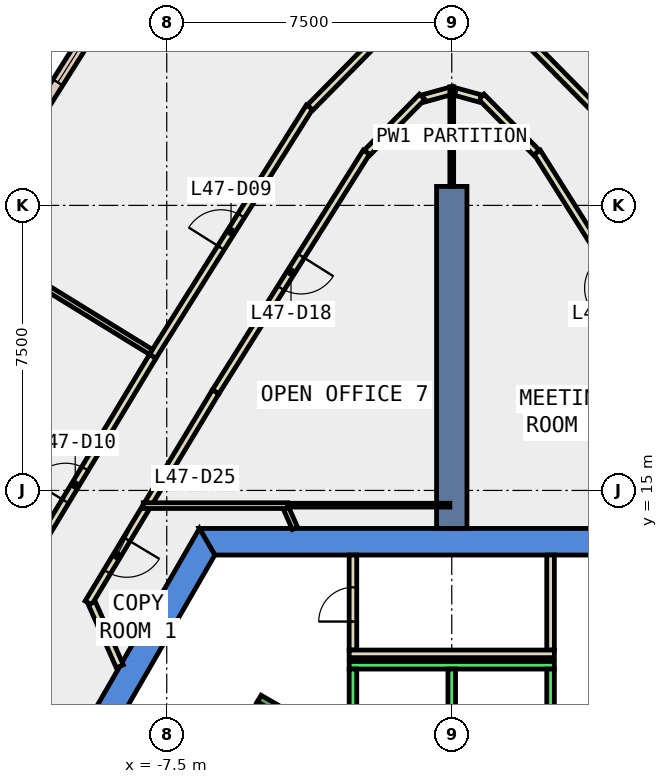
"""IFC4 building model, lengths in metres.
Left out: names, types, materials, properties, quantities, classifications, styles, units other than length and angle.
Written with IfcOpenShell. Run it as: python <this file> out.ifc"""

import sys

from ifc_helpers import new_model, si_unit, direction, frame, frame_2d, origin, place, context, subcontext, project, spatial, polyline, rectangle, outline, extrude, element, fill, save


model = new_model("IFC4")
c1 = context("Model", 3, precision=1e-05, world=origin(), true_north=direction((0.0, 1.0)))
c2 = subcontext(c1, "Body", "Model", "MODEL_VIEW")
j1 = project(units=[si_unit("LENGTHUNIT", "METRE"), si_unit("PLANEANGLEUNIT", "RADIAN")], contexts=[c1])
p1 = place(None, origin())
s1 = spatial("IfcSite", under=j1, at=p1, CompositionType="ELEMENT")
p2 = place(p1, origin())
s2 = spatial("IfcBuilding", under=s1, at=p2, CompositionType="ELEMENT")
p3 = place(p2, frame((0.0, 0.0, 210.8)))
s3 = spatial("IfcBuildingStorey", under=s2, at=p3, CompositionType="ELEMENT", Elevation=210.8)
p4 = place(p3, frame((0.0, 0.0, -0.4)))
e1 = element("IfcWall", 1, at=p4, inside=s3, PredefinedType="SHEAR", context=c2, shape_type="SweptSolid", body=[
    extrude(outline(polyline([(6.64, 14.0), (-6.64, 14.0), (-6.235, 13.3), (6.235, 13.3), (6.64, 14.0)])), origin(), (0.0, 0.0, 1.0), 4.2),
])
p5 = place(p3, frame((0.0, 0.0, -0.4)))
e2 = element("IfcWall", 2, at=p5, inside=s3, PredefinedType="SHEAR", context=c2, shape_type="SweptSolid", body=[
    extrude(outline(polyline([(-11.834, 5.002), (-11.228, 4.652), (-6.235, 13.3), (-6.64, 14.0), (-11.834, 5.002)])), origin(), (0.0, 0.0, 1.0), 4.2),
])
p6 = place(p3, frame((0.0, 14.0, -0.4), z_axis=(0.0, 0.0, 1.0), x_axis=(0.0, 1.0, 0.0)))
e3 = element("IfcWall", 3, at=p6, inside=s3, PredefinedType="SHEAR", context=c2, shape_type="SweptSolid", body=[
    extrude(rectangle(XDim=9.0, YDim=0.8, at=frame_2d((4.5, 0.0))), origin(), (0.0, 0.0, 1.0), 4.2),
])
p7 = place(p3, frame((-8.759, 28.29, 0.0), z_axis=(0.0, 0.0, 1.0), x_axis=(-0.532522107002, -0.84641609481, 0.0)))
e4 = element("IfcWall", 4, at=p7, inside=s3, PredefinedType="STANDARD", context=c2, shape_type="SweptSolid", body=[
    extrude(rectangle(XDim=7.273, YDim=0.3, at=frame_2d((3.636, 0.0))), origin(), (0.0, 0.0, 1.0), 3.8),
])
p8 = place(p7, frame((0.618, 0.0, 0.9)))
e5 = element("IfcOpeningElement", 5, at=p8, cuts=e4, PredefinedType="OPENING", context=c2, shape_type="SweptSolid", body=[
    extrude(rectangle(XDim=2.4, YDim=2.6, at=frame_2d((1.2, 1.3))), frame((0.0, 0.16, 0.0), z_axis=(0.0, -1.0, 0.0), x_axis=(1.0, 0.0, 0.0)), (0.0, 0.0, 1.0), 0.32),
])
p9 = place(p7, frame((4.255, 0.0, 0.9)))
e6 = element("IfcOpeningElement", 6, at=p9, cuts=e4, PredefinedType="OPENING", context=c2, shape_type="SweptSolid", body=[
    extrude(rectangle(XDim=2.4, YDim=2.6, at=frame_2d((1.2, 1.3))), frame((0.0, 0.16, 0.0), z_axis=(0.0, -1.0, 0.0), x_axis=(1.0, 0.0, 0.0)), (0.0, 0.0, 1.0), 0.32),
])
p10 = place(p3, frame((-8.057, 14.536, 0.0), z_axis=(0.0, 0.0, 1.0), x_axis=(-0.516268010323, -0.856427078926, 0.0)))
e7 = element("IfcWall", 7, at=p10, inside=s3, PredefinedType="PARTITIONING", context=c2, shape_type="SweptSolid", body=[
    extrude(rectangle(XDim=2.915, YDim=0.2, at=frame_2d((1.458, 0.0))), origin(), (0.0, 0.0, 1.0), 3.8),
])
p11 = place(p10, frame((0.958, 0.0, 0.0)))
e8 = element("IfcOpeningElement", 8, at=p11, cuts=e7, PredefinedType="OPENING", context=c2, shape_type="SweptSolid", body=[
    extrude(rectangle(XDim=1.0, YDim=2.1, at=frame_2d((0.5, 1.05))), frame((0.0, 0.11, 0.0), z_axis=(0.0, -1.0, 0.0), x_axis=(1.0, 0.0, 0.0)), (0.0, 0.0, 1.0), 0.22),
])
p12 = place(p3, frame((-9.47, 12.033, 0.0), z_axis=(0.0, 0.0, 1.0), x_axis=(0.40441741061, -0.914574522931, 0.0)))
e9 = element("IfcWall", 9, at=p12, inside=s3, PredefinedType="PARTITIONING", context=c2, shape_type="SweptSolid", body=[
    extrude(rectangle(XDim=1.817, YDim=0.2, at=frame_2d((0.909, 0.0))), origin(), (0.0, 0.0, 1.0), 3.8),
])
p13 = place(p3, frame((6.213, 17.595, 0.0), z_axis=(0.0, 0.0, 1.0), x_axis=(-0.532527247309, 0.846412860768, 0.0)))
e10 = element("IfcWall", 10, at=p13, inside=s3, PredefinedType="PARTITIONING", context=c2, shape_type="SweptSolid", body=[
    extrude(rectangle(XDim=7.449, YDim=0.2, at=frame_2d((3.725, 0.0))), origin(), (0.0, 0.0, 1.0), 3.8),
])
p14 = place(p13, frame((3.225, 0.0, 0.0)))
e11 = element("IfcOpeningElement", 11, at=p14, cuts=e10, PredefinedType="OPENING", context=c2, shape_type="SweptSolid", body=[
    extrude(rectangle(XDim=1.0, YDim=2.1, at=frame_2d((0.5, 1.05))), frame((0.0, 0.11, 0.0), z_axis=(0.0, -1.0, 0.0), x_axis=(1.0, 0.0, 0.0)), (0.0, 0.0, 1.0), 0.22),
])
p15 = place(p3, frame((2.229, 23.887, 0.0), z_axis=(0.0, 0.0, 1.0), x_axis=(-0.702245482258, 0.711934886523, 0.0)))
e12 = element("IfcWall", 12, at=p15, inside=s3, PredefinedType="PARTITIONING", context=c2, shape_type="SweptSolid", body=[
    extrude(rectangle(XDim=2.066, YDim=0.2, at=frame_2d((1.033, 0.0))), origin(), (0.0, 0.0, 1.0), 3.8),
])
p16 = place(p3, frame((0.752, 25.313, 0.0), z_axis=(0.0, 0.0, 1.0), x_axis=(-0.964381816756, 0.264514104559, 0.0)))
e13 = element("IfcWall", 13, at=p16, inside=s3, PredefinedType="PARTITIONING", context=c2, shape_type="SweptSolid", body=[
    extrude(rectangle(XDim=0.68, YDim=0.2, at=frame_2d((0.34, 0.0))), origin(), (0.0, 0.0, 1.0), 3.8),
])
p17 = place(p3, frame((0.048, 25.533, 0.0), z_axis=(0.0, 0.0, 1.0), x_axis=(-0.964218556253, -0.265108611286, 0.0)))
e14 = element("IfcWall", 14, at=p17, inside=s3, PredefinedType="PARTITIONING", context=c2, shape_type="SweptSolid", body=[
    extrude(rectangle(XDim=0.83, YDim=0.2, at=frame_2d((0.415, 0.0))), origin(), (0.0, 0.0, 1.0), 3.8),
])
p18 = place(p3, frame((-0.778, 25.358, 0.0), z_axis=(0.0, 0.0, 1.0), x_axis=(-0.702245482258, -0.711934886523, 0.0)))
e15 = element("IfcWall", 15, at=p18, inside=s3, PredefinedType="PARTITIONING", context=c2, shape_type="SweptSolid", body=[
    extrude(rectangle(XDim=2.066, YDim=0.2, at=frame_2d((1.033, 0.0))), origin(), (0.0, 0.0, 1.0), 3.8),
])
p19 = place(p3, frame((-2.246, 23.9, 0.0), z_axis=(0.0, 0.0, 1.0), x_axis=(-0.532527247309, -0.846412860768, 0.0)))
e16 = element("IfcWall", 16, at=p19, inside=s3, PredefinedType="PARTITIONING", context=c2, shape_type="SweptSolid", body=[
    extrude(rectangle(XDim=7.449, YDim=0.2, at=frame_2d((3.725, 0.0))), origin(), (0.0, 0.0, 1.0), 3.8),
])
p20 = place(p19, frame((3.225, 0.0, 0.0)))
e17 = element("IfcOpeningElement", 17, at=p20, cuts=e16, PredefinedType="OPENING", context=c2, shape_type="SweptSolid", body=[
    extrude(rectangle(XDim=1.0, YDim=2.1, at=frame_2d((0.5, 1.05))), frame((0.0, 0.11, 0.0), z_axis=(0.0, -1.0, 0.0), x_axis=(1.0, 0.0, 0.0)), (0.0, 0.0, 1.0), 0.22),
])
p21 = place(p3, frame((-6.213, 17.595, 0.0), z_axis=(0.0, 0.0, 1.0), x_axis=(-0.516121112316, -0.856515614231, 0.0)))
e18 = element("IfcWall", 18, at=p21, inside=s3, PredefinedType="PARTITIONING", context=c2, shape_type="SweptSolid", body=[
    extrude(rectangle(XDim=3.422, YDim=0.2, at=frame_2d((1.711, 0.0))), origin(), (0.0, 0.0, 1.0), 3.8),
])
p22 = place(p3, frame((-7.871, 18.528, 0.0), z_axis=(0.0, 0.0, 1.0), x_axis=(0.532587642146, 0.846374859878, 0.0)))
e19 = element("IfcWall", 19, at=p22, inside=s3, PredefinedType="PARTITIONING", context=c2, shape_type="SweptSolid", body=[
    extrude(rectangle(XDim=7.749, YDim=0.2, at=frame_2d((3.875, 0.0))), origin(), (0.0, 0.0, 1.0), 3.8),
])
p23 = place(p22, frame((3.375, 0.0, 0.0)))
e20 = element("IfcOpeningElement", 20, at=p23, cuts=e19, PredefinedType="OPENING", context=c2, shape_type="SweptSolid", body=[
    extrude(rectangle(XDim=1.0, YDim=2.1, at=frame_2d((0.5, 1.05))), frame((0.0, 0.11, 0.0), z_axis=(0.0, -1.0, 0.0), x_axis=(1.0, 0.0, 0.0)), (0.0, 0.0, 1.0), 0.22),
])
for number, where, z_axis, x_axis in (
    (21, (-3.727, 25.074, 0.0), (0.0, 0.0, 1.0), (0.702, 0.712, 0.0)),
    (22, (1.773, 27.056, 0.0), (0.0, 0.0, 1.0), (0.702, -0.712, 0.0)),
):
    element("IfcWall", number, at=place(p3, frame(where, z_axis=z_axis, x_axis=x_axis)), inside=s3, PredefinedType="PARTITIONING", context=c2, shape_type="SweptSolid", body=[
        extrude(rectangle(XDim=2.783, YDim=0.2, at=frame_2d((1.392, 0.0))), origin(), (0.0, 0.0, 1.0), 3.8),
    ])
p24 = place(p3, frame((-12.025, 11.633, 0.0), z_axis=(0.0, 0.0, 1.0), x_axis=(0.516283129542, 0.856417964636, 0.0)))
e23 = element("IfcWall", 23, at=p24, inside=s3, PredefinedType="PARTITIONING", context=c2, shape_type="SweptSolid", body=[
    extrude(rectangle(XDim=8.05, YDim=0.2, at=frame_2d((4.025, 0.0))), origin(), (0.0, 0.0, 1.0), 3.8),
])
p25 = place(p24, frame((3.6, 0.0, 0.0)))
e24 = element("IfcOpeningElement", 24, at=p25, cuts=e23, PredefinedType="OPENING", context=c2, shape_type="SweptSolid", body=[
    extrude(rectangle(XDim=1.0, YDim=2.1, at=frame_2d((0.5, 1.05))), frame((0.0, 0.11, 0.0), z_axis=(0.0, -1.0, 0.0), x_axis=(1.0, 0.0, 0.0)), (0.0, 0.0, 1.0), 0.22),
])
p26 = place(p3, frame((-2.6, 10.8, 0.0), z_axis=(0.0, 0.0, 1.0), x_axis=(0.0, 1.0, 0.0)))
e25 = element("IfcWall", 25, at=p26, inside=s3, PredefinedType="PARTITIONING", context=c2, shape_type="SweptSolid", body=[
    extrude(rectangle(XDim=2.5, YDim=0.2, at=frame_2d((1.25, 0.0))), origin(), (0.0, 0.0, 1.0), 3.8),
])
p27 = place(p26, frame((0.75, 0.0, 0.0)))
e26 = element("IfcOpeningElement", 26, at=p27, cuts=e25, PredefinedType="OPENING", context=c2, shape_type="SweptSolid", body=[
    extrude(rectangle(XDim=0.9, YDim=2.1, at=frame_2d((0.45, 1.05))), frame((0.0, 0.11, 0.0), z_axis=(0.0, -1.0, 0.0), x_axis=(1.0, 0.0, 0.0)), (0.0, 0.0, 1.0), 0.22),
])
p28 = place(p3, frame((2.6, 13.3, 0.0), z_axis=(0.0, 0.0, 1.0), x_axis=(0.0, -1.0, 0.0)))
e27 = element("IfcWall", 27, at=p28, inside=s3, PredefinedType="PARTITIONING", context=c2, shape_type="SweptSolid", body=[
    extrude(rectangle(XDim=2.5, YDim=0.2, at=frame_2d((1.25, 0.0))), origin(), (0.0, 0.0, 1.0), 3.8),
])
p29 = place(p3, frame((2.7, 10.7, 0.0), z_axis=(0.0, 0.0, 1.0), x_axis=(-1.0, 0.0, 0.0)))
e28 = element("IfcWall", 28, at=p29, inside=s3, PredefinedType="PARTITIONING", context=c2, shape_type="SweptSolid", body=[
    extrude(rectangle(XDim=5.4, YDim=0.2, at=frame_2d((2.7, 0.0))), origin(), (0.0, 0.0, 1.0), 3.8),
])
p30 = place(p3, frame((-4.125, 14.0, 0.0), z_axis=(0.0, 0.0, 1.0), x_axis=(-0.404850841056, 0.914382740703, 0.0)))
e29 = element("IfcWall", 29, at=p30, inside=s3, PredefinedType="PARTITIONING", context=c2, shape_type="SweptSolid", body=[
    extrude(rectangle(XDim=0.581, YDim=0.15, at=frame_2d((0.291, 0.0))), origin(), (0.0, 0.0, 1.0), 3.8),
])
p31 = place(p3, frame((-4.316, 14.6, 0.0), z_axis=(0.0, 0.0, 1.0), x_axis=(-1.0, 0.0, 0.0)))
e30 = element("IfcWall", 30, at=p31, inside=s3, PredefinedType="PARTITIONING", context=c2, shape_type="SweptSolid", body=[
    extrude(rectangle(XDim=3.802, YDim=0.15, at=frame_2d((1.901, 0.0))), origin(), (0.0, 0.0, 1.0), 3.8),
])
p32 = place(p3, frame((-4.316, 14.612, 0.0), z_axis=(0.0, 0.0, 1.0), x_axis=(1.0, 0.0, 0.0)))
e31 = element("IfcWall", 31, at=p32, inside=s3, PredefinedType="PARTITIONING", context=c2, shape_type="SweptSolid", body=[
    extrude(rectangle(XDim=4.266, YDim=0.1, at=frame_2d((2.133, 0.0))), origin(), (0.0, 0.0, 1.0), 3.8),
])
p33 = place(p3, frame((0.0, 23.0, 0.0), z_axis=(0.0, 0.0, 1.0), x_axis=(0.0, 1.0, 0.0)))
e32 = element("IfcWall", 32, at=p33, inside=s3, PredefinedType="PARTITIONING", context=c2, shape_type="SweptSolid", body=[
    extrude(rectangle(XDim=2.62, YDim=0.1, at=frame_2d((1.31, 0.0))), origin(), (0.0, 0.0, 1.0), 3.8),
])
p34 = place(p3, frame((-7.916, 18.644, 0.0), z_axis=(0.0, 0.0, 1.0), x_axis=(-0.851543444049, 0.524284047914, 0.0)))
e33 = element("IfcWall", 33, at=p34, inside=s3, PredefinedType="PARTITIONING", context=c2, shape_type="SweptSolid", body=[
    extrude(rectangle(XDim=4.379, YDim=0.15, at=frame_2d((2.189, 0.0))), origin(), (0.0, 0.0, 1.0), 3.8),
])
p35 = place(p3, frame((2.7, 10.4, 0.0), z_axis=(0.0, 0.0, 1.0), x_axis=(-1.0, 0.0, 0.0)))
e34 = element("IfcWall", 34, at=p35, inside=s3, PredefinedType="STANDARD", context=c2, shape_type="SweptSolid", body=[
    extrude(rectangle(XDim=5.4, YDim=0.2, at=frame_2d((2.7, 0.0))), origin(), (0.0, 0.0, 1.0), 3.8),
])
for number, where, z_axis, x_axis in (
    (35, (2.6, 7.9, 0.0), (0.0, 0.0, 1.0), (0.0, 1.0, 0.0)),
    (36, (0.0, 7.9, 0.0), (0.0, 0.0, 1.0), (0.0, 1.0, 0.0)),
    (37, (-2.6, 7.9, 0.0), (0.0, 0.0, 1.0), (0.0, 1.0, 0.0)),
):
    element("IfcWall", number, at=place(p3, frame(where, z_axis=z_axis, x_axis=x_axis)), inside=s3, PredefinedType="STANDARD", context=c2, shape_type="SweptSolid", body=[
        extrude(rectangle(XDim=2.4, YDim=0.2, at=frame_2d((1.2, 0.0))), origin(), (0.0, 0.0, 1.0), 3.8),
    ])
p36 = place(p3, frame((2.7, 8.158, 0.0), z_axis=(0.0, 0.0, 1.0), x_axis=(0.86611865017, 0.499838457731, 0.0)))
e38 = element("IfcWall", 38, at=p36, inside=s3, PredefinedType="STANDARD", context=c2, shape_type="SweptSolid", body=[
    extrude(rectangle(XDim=2.733, YDim=0.2, at=frame_2d((1.366, 0.0))), origin(), (0.0, 0.0, 1.0), 3.8),
])
p37 = place(p3, frame((-1.256, 7.324, 0.0), z_axis=(0.0, 0.0, 1.0), x_axis=(-0.866046073146, 0.499964197906, 0.0)))
e39 = element("IfcWall", 39, at=p37, inside=s3, PredefinedType="STANDARD", context=c2, shape_type="SweptSolid", body=[
    extrude(rectangle(XDim=4.4, YDim=0.2, at=frame_2d((2.2, 0.0))), origin(), (0.0, 0.0, 1.0), 3.8),
])
p38 = place(p37, frame((2.4, 0.0, 0.0)))
e40 = element("IfcOpeningElement", 40, at=p38, cuts=e39, PredefinedType="OPENING", context=c2, shape_type="SweptSolid", body=[
    extrude(rectangle(XDim=1.1, YDim=2.2, at=frame_2d((0.55, 1.1))), frame((0.0, 0.11, 0.0), z_axis=(0.0, -1.0, 0.0), x_axis=(1.0, 0.0, 0.0)), (0.0, 0.0, 1.0), 0.22),
])
p39 = place(p3, frame((-5.03, 9.388, 0.0), z_axis=(0.0, 0.0, 1.0), x_axis=(-0.499978703459, -0.866037698999, 0.0)))
e41 = element("IfcWall", 41, at=p39, inside=s3, PredefinedType="STANDARD", context=c2, shape_type="SweptSolid", body=[
    extrude(rectangle(XDim=6.9, YDim=0.2, at=frame_2d((3.45, 0.0))), origin(), (0.0, 0.0, 1.0), 3.8),
])
p40 = place(p8, origin())
e42 = element("IfcWindow", 42, at=p40, inside=s3, PartitioningType="SINGLE_PANEL", PredefinedType="WINDOW", context=c2, shape_type="SweptSolid", body=[
    extrude(rectangle(XDim=2.4, YDim=2.6, at=frame_2d((1.2, 1.3))), frame((0.0, 0.03, 0.0), z_axis=(0.0, -1.0, 0.0), x_axis=(1.0, 0.0, 0.0)), (0.0, 0.0, 1.0), 0.06),
])
fill(e5, e42)
p41 = place(p23, origin())
e43 = element("IfcDoor", 43, at=p41, inside=s3, OperationType="SINGLE_SWING_LEFT", PredefinedType="DOOR", context=c2, shape_type="SweptSolid", body=[
    extrude(rectangle(XDim=1.0, YDim=2.1, at=frame_2d((0.5, 1.05))), frame((0.0, 0.025, 0.0), z_axis=(0.0, -1.0, 0.0), x_axis=(1.0, 0.0, 0.0)), (0.0, 0.0, 1.0), 0.05),
])
fill(e20, e43)
p42 = place(p25, origin())
e44 = element("IfcDoor", 44, at=p42, inside=s3, OperationType="SINGLE_SWING_LEFT", PredefinedType="DOOR", context=c2, shape_type="SweptSolid", body=[
    extrude(rectangle(XDim=1.0, YDim=2.1, at=frame_2d((0.5, 1.05))), frame((0.0, 0.025, 0.0), z_axis=(0.0, -1.0, 0.0), x_axis=(1.0, 0.0, 0.0)), (0.0, 0.0, 1.0), 0.05),
])
fill(e24, e44)
p43 = place(p20, origin())
e45 = element("IfcDoor", 45, at=p43, inside=s3, OperationType="SINGLE_SWING_LEFT", PredefinedType="DOOR", context=c2, shape_type="SweptSolid", body=[
    extrude(rectangle(XDim=1.0, YDim=2.1, at=frame_2d((0.5, 1.05))), frame((0.0, 0.025, 0.0), z_axis=(0.0, -1.0, 0.0), x_axis=(1.0, 0.0, 0.0)), (0.0, 0.0, 1.0), 0.05),
])
fill(e17, e45)
p44 = place(p11, origin())
e46 = element("IfcDoor", 46, at=p44, inside=s3, OperationType="SINGLE_SWING_LEFT", PredefinedType="DOOR", context=c2, shape_type="SweptSolid", body=[
    extrude(rectangle(XDim=1.0, YDim=2.1, at=frame_2d((0.5, 1.05))), frame((0.0, 0.025, 0.0), z_axis=(0.0, -1.0, 0.0), x_axis=(1.0, 0.0, 0.0)), (0.0, 0.0, 1.0), 0.05),
])
fill(e8, e46)
p45 = place(p27, origin())
e47 = element("IfcDoor", 47, at=p45, inside=s3, OperationType="SINGLE_SWING_RIGHT", PredefinedType="DOOR", context=c2, shape_type="SweptSolid", body=[
    extrude(rectangle(XDim=0.9, YDim=2.1, at=frame_2d((0.45, 1.05))), frame((0.0, 0.025, 0.0), z_axis=(0.0, -1.0, 0.0), x_axis=(1.0, 0.0, 0.0)), (0.0, 0.0, 1.0), 0.05),
])
fill(e26, e47)
save(model, sys.argv[1])
